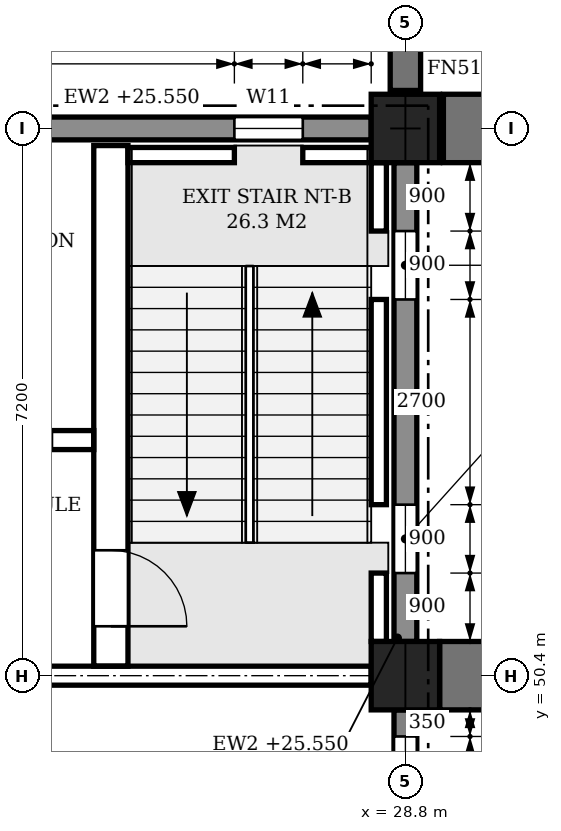
"""IFC4 building model, lengths in metres.
Left out: names, types, materials, properties, quantities, classifications, styles, units other than length and angle.
Written with IfcOpenShell. Run it as: python <this file> out.ifc"""

import sys

from ifc_helpers import new_model, si_unit, direction, frame, frame_2d, origin, origin_2d, place, context, subcontext, project, spatial, polyline, rectangle, outline, extrude, element, fill, save


model = new_model("IFC4")
c1 = context("Model", 3, precision=1e-05, world=origin(), true_north=direction((0.0, 1.0)))
c2 = subcontext(c1, "Body", "Model", "MODEL_VIEW")
j1 = project(units=[si_unit("LENGTHUNIT", "METRE"), si_unit("PLANEANGLEUNIT", "RADIAN")], contexts=[c1])
p1 = place(None, origin())
s1 = spatial("IfcSite", under=j1, at=p1, CompositionType="ELEMENT")
p2 = place(p1, origin())
s2 = spatial("IfcBuilding", under=s1, at=p2, CompositionType="ELEMENT")
p3 = place(p2, frame((0.0, 0.0, 21.6)))
s3 = spatial("IfcBuildingStorey", under=s2, at=p3, CompositionType="ELEMENT", Elevation=21.6)
for number, where, z_axis, x_axis in (
    (1, (28.8, 50.4, 0.0), (0.0, 0.0, 1.0), (1.0, 0.0, 0.0)),
    (2, (28.8, 57.6, 0.0), (0.0, 0.0, 1.0), (1.0, 0.0, 0.0)),
):
    element("IfcColumn", number, at=place(p3, frame(where, z_axis=z_axis, x_axis=x_axis)), inside=s3, PredefinedType="COLUMN", context=c2, shape_type="SweptSolid", body=[
        extrude(rectangle(XDim=0.9, YDim=0.9, at=origin_2d()), origin(), (0.0, 0.0, 1.0), 4.8),
    ])
p4 = place(p3, frame((28.35, 57.6, 0.0), z_axis=(0.0, 0.0, 1.0), x_axis=(-1.0, 0.0, 0.0)))
e3 = element("IfcWall", 3, at=p4, inside=s3, PredefinedType="STANDARD", context=c2, shape_type="SweptSolid", body=[
    extrude(rectangle(XDim=6.3, YDim=0.3, at=frame_2d((3.15, 0.0))), origin(), (0.0, 0.0, 1.0), 3.95),
])
p5 = place(p4, frame((0.9, 0.0, 0.9)))
e4 = element("IfcOpeningElement", 4, at=p5, cuts=e3, PredefinedType="OPENING", context=c2, shape_type="SweptSolid", body=[
    extrude(outline(polyline([(0.0, 0.0), (0.9, 0.0), (0.9, 2.05), (0.45, 2.5), (0.0, 2.05), (0.0, 0.0)])), frame((0.0, 0.16, 0.0), z_axis=(0.0, -1.0, 0.0), x_axis=(1.0, 0.0, 0.0)), (0.0, 0.0, 1.0), 0.32),
])
p6 = place(p3, frame((28.8, 43.65, 0.0), z_axis=(0.0, 0.0, 1.0), x_axis=(0.0, 1.0, 0.0)))
e5 = element("IfcWall", 5, at=p6, inside=s3, PredefinedType="STANDARD", context=c2, shape_type="SweptSolid", body=[
    extrude(rectangle(XDim=6.3, YDim=0.3, at=frame_2d((3.15, 0.0))), origin(), (0.0, 0.0, 1.0), 3.95),
])
p7 = place(p6, frame((3.95, 0.0, 0.9)))
e6 = element("IfcOpeningElement", 6, at=p7, cuts=e5, PredefinedType="OPENING", context=c2, shape_type="SweptSolid", body=[
    extrude(outline(polyline([(0.0, 0.0), (0.85, 0.0), (0.85, 2.05), (0.425, 2.5), (0.0, 2.05), (0.0, 0.0)])), frame((0.0, 0.16, 0.0), z_axis=(0.0, -1.0, 0.0), x_axis=(1.0, 0.0, 0.0)), (0.0, 0.0, 1.0), 0.32),
])
p8 = place(p6, frame((5.1, 0.0, 0.9)))
e7 = element("IfcOpeningElement", 7, at=p8, cuts=e5, PredefinedType="OPENING", context=c2, shape_type="SweptSolid", body=[
    extrude(outline(polyline([(0.0, 0.0), (0.85, 0.0), (0.85, 2.05), (0.425, 2.5), (0.0, 2.05), (0.0, 0.0)])), frame((0.0, 0.16, 0.0), z_axis=(0.0, -1.0, 0.0), x_axis=(1.0, 0.0, 0.0)), (0.0, 0.0, 1.0), 0.32),
])
p9 = place(p3, frame((28.8, 50.85, 0.0), z_axis=(0.0, 0.0, 1.0), x_axis=(0.0, 1.0, 0.0)))
e8 = element("IfcWall", 8, at=p9, inside=s3, PredefinedType="STANDARD", context=c2, shape_type="SweptSolid", body=[
    extrude(rectangle(XDim=6.3, YDim=0.3, at=frame_2d((3.15, 0.0))), origin(), (0.0, 0.0, 1.0), 3.95),
])
p10 = place(p9, frame((0.9, 0.0, 0.9)))
e9 = element("IfcOpeningElement", 9, at=p10, cuts=e8, PredefinedType="OPENING", context=c2, shape_type="SweptSolid", body=[
    extrude(outline(polyline([(0.0, 0.0), (0.9, 0.0), (0.9, 2.05), (0.45, 2.5), (0.0, 2.05), (0.0, 0.0)])), frame((0.0, 0.16, 0.0), z_axis=(0.0, -1.0, 0.0), x_axis=(1.0, 0.0, 0.0)), (0.0, 0.0, 1.0), 0.32),
])
p11 = place(p9, frame((4.5, 0.0, 0.9)))
e10 = element("IfcOpeningElement", 10, at=p11, cuts=e8, PredefinedType="OPENING", context=c2, shape_type="SweptSolid", body=[
    extrude(outline(polyline([(0.0, 0.0), (0.9, 0.0), (0.9, 2.05), (0.45, 2.5), (0.0, 2.05), (0.0, 0.0)])), frame((0.0, 0.16, 0.0), z_axis=(0.0, -1.0, 0.0), x_axis=(1.0, 0.0, 0.0)), (0.0, 0.0, 1.0), 0.32),
])
p12 = place(p3, frame((29.25, 50.4, -0.25), z_axis=(0.0, 0.0, 1.0), x_axis=(1.0, 0.0, 0.0)))
e11 = element("IfcWall", 11, at=p12, inside=s3, PredefinedType="POLYGONAL", context=c2, shape_type="SweptSolid", body=[
    extrude(outline(polyline([(1.1, 0.0), (1.1, 19.2), (0.0, 19.2), (0.0, 0.0), (1.1, 0.0)])), frame((0.0, 0.45, 0.0), z_axis=(0.0, -1.0, 0.0), x_axis=(1.0, 0.0, 0.0)), (0.0, 0.0, 1.0), 0.9),
])
p13 = place(p3, frame((28.8, 58.1, -0.25), z_axis=(0.0, 0.0, 1.0), x_axis=(0.0, 1.0, 0.0)))
e12 = element("IfcWall", 12, at=p13, inside=s3, PredefinedType="POLYGONAL", context=c2, shape_type="SweptSolid", body=[
    extrude(outline(polyline([(0.85, 0.0), (0.85, 18.9), (0.65, 19.2), (0.0, 19.2), (0.0, 0.0), (0.85, 0.0)])), frame((0.0, 0.2, 0.0), z_axis=(0.0, -1.0, 0.0), x_axis=(1.0, 0.0, 0.0)), (0.0, 0.0, 1.0), 0.4),
])
p14 = place(p3, frame((29.3, 57.6, -0.25), z_axis=(0.0, 0.0, 1.0), x_axis=(1.0, 0.0, 0.0)))
e13 = element("IfcWall", 13, at=p14, inside=s3, PredefinedType="POLYGONAL", context=c2, shape_type="SweptSolid", body=[
    extrude(outline(polyline([(1.1, 0.0), (1.1, 19.2), (0.0, 19.2), (0.0, 0.0), (1.1, 0.0)])), frame((0.0, 0.45, 0.0), z_axis=(0.0, -1.0, 0.0), x_axis=(1.0, 0.0, 0.0)), (0.0, 0.0, 1.0), 0.9),
])
p15 = place(p3, frame((22.05, 50.4, 0.0), z_axis=(0.0, 0.0, 1.0), x_axis=(1.0, 0.0, 0.0)))
e14 = element("IfcWall", 14, at=p15, inside=s3, PredefinedType="SHEAR", context=c2, shape_type="SweptSolid", body=[
    extrude(rectangle(XDim=6.3, YDim=0.25, at=frame_2d((3.15, 0.0))), origin(), (0.0, 0.0, 1.0), 3.8),
])
p16 = place(p15, frame((0.4, 0.0, 0.0)))
e15 = element("IfcOpeningElement", 15, at=p16, cuts=e14, PredefinedType="OPENING", context=c2, shape_type="SweptSolid", body=[
    extrude(rectangle(XDim=1.1, YDim=2.1, at=frame_2d((0.55, 1.05))), frame((0.0, 0.135, 0.0), z_axis=(0.0, -1.0, 0.0), x_axis=(1.0, 0.0, 0.0)), (0.0, 0.0, 1.0), 0.27),
])
p17 = place(p3, frame((28.45, 50.85, -0.25), z_axis=(0.0, 0.0, 1.0), x_axis=(0.0, 1.0, 0.0)))
e16 = element("IfcWall", 16, at=p17, inside=s3, PredefinedType="SHEAR", context=c2, shape_type="SweptSolid", body=[
    extrude(rectangle(XDim=0.9, YDim=0.2, at=frame_2d((0.45, 0.0))), origin(), (0.0, 0.0, 1.0), 4.8),
])
p18 = place(p3, frame((28.45, 52.65, -0.25), z_axis=(0.0, 0.0, 1.0), x_axis=(0.0, 1.0, 0.0)))
e17 = element("IfcWall", 17, at=p18, inside=s3, PredefinedType="SHEAR", context=c2, shape_type="SweptSolid", body=[
    extrude(rectangle(XDim=2.7, YDim=0.2, at=frame_2d((1.35, 0.0))), origin(), (0.0, 0.0, 1.0), 4.8),
])
p19 = place(p3, frame((28.45, 56.25, -0.25), z_axis=(0.0, 0.0, 1.0), x_axis=(0.0, 1.0, 0.0)))
e18 = element("IfcWall", 18, at=p19, inside=s3, PredefinedType="SHEAR", context=c2, shape_type="SweptSolid", body=[
    extrude(rectangle(XDim=0.9, YDim=0.2, at=frame_2d((0.45, 0.0))), origin(), (0.0, 0.0, 1.0), 4.8),
])
p20 = place(p3, frame((25.15, 57.25, -0.25), z_axis=(0.0, 0.0, 1.0), x_axis=(1.0, 0.0, 0.0)))
e19 = element("IfcWall", 19, at=p20, inside=s3, PredefinedType="SHEAR", context=c2, shape_type="SweptSolid", body=[
    extrude(rectangle(XDim=1.4, YDim=0.2, at=frame_2d((0.7, 0.0))), origin(), (0.0, 0.0, 1.0), 4.8),
])
p21 = place(p3, frame((27.45, 57.25, -0.25), z_axis=(0.0, 0.0, 1.0), x_axis=(1.0, 0.0, 0.0)))
e20 = element("IfcWall", 20, at=p21, inside=s3, PredefinedType="SHEAR", context=c2, shape_type="SweptSolid", body=[
    extrude(rectangle(XDim=0.9, YDim=0.2, at=frame_2d((0.45, 0.0))), origin(), (0.0, 0.0, 1.0), 4.8),
])
p22 = place(p3, frame((24.925, 50.525, 0.0), z_axis=(0.0, 0.0, 1.0), x_axis=(0.0, 1.0, 0.0)))
e21 = element("IfcWall", 21, at=p22, inside=s3, PredefinedType="SHEAR", context=c2, shape_type="SweptSolid", body=[
    extrude(rectangle(XDim=6.85, YDim=0.45, at=frame_2d((3.425, 0.0))), origin(), (0.0, 0.0, 1.0), 4.55),
])
p23 = place(p22, frame((0.525, 0.0, 0.0)))
e22 = element("IfcOpeningElement", 22, at=p23, cuts=e21, PredefinedType="OPENING", context=c2, shape_type="SweptSolid", body=[
    extrude(rectangle(XDim=1.0, YDim=2.1, at=frame_2d((0.5, 1.05))), frame((0.0, 0.235, 0.0), z_axis=(0.0, -1.0, 0.0), x_axis=(1.0, 0.0, 0.0)), (0.0, 0.0, 1.0), 0.47),
])
p24 = place(p3, frame((21.725, 53.5, 0.0), z_axis=(0.0, 0.0, 1.0), x_axis=(1.0, 0.0, 0.0)))
e23 = element("IfcWall", 23, at=p24, inside=s3, PredefinedType="SHEAR", context=c2, shape_type="SweptSolid", body=[
    extrude(rectangle(XDim=2.975, YDim=0.25, at=frame_2d((1.487, 0.0))), origin(), (0.0, 0.0, 1.0), 4.55),
])
p25 = place(p24, frame((1.525, 0.0, 0.0)))
e24 = element("IfcOpeningElement", 24, at=p25, cuts=e23, PredefinedType="OPENING", context=c2, shape_type="SweptSolid", body=[
    extrude(rectangle(XDim=0.9, YDim=2.1, at=frame_2d((0.45, 1.05))), frame((0.0, 0.135, 0.0), z_axis=(0.0, -1.0, 0.0), x_axis=(1.0, 0.0, 0.0)), (0.0, 0.0, 1.0), 0.27),
])
p26 = place(p8, origin())
e25 = element("IfcWindow", 25, at=p26, inside=s3, PartitioningType="SINGLE_PANEL", PredefinedType="WINDOW", context=c2, shape_type="SweptSolid", body=[
    extrude(outline(polyline([(0.0, 0.0), (0.85, 0.0), (0.85, 2.05), (0.425, 2.5), (0.0, 2.05), (0.0, 0.0)])), frame((0.0, 0.03, 0.0), z_axis=(0.0, -1.0, 0.0), x_axis=(1.0, 0.0, 0.0)), (0.0, 0.0, 1.0), 0.06),
])
fill(e7, e25)
p27 = place(p10, origin())
e26 = element("IfcWindow", 26, at=p27, inside=s3, PartitioningType="SINGLE_PANEL", PredefinedType="WINDOW", context=c2, shape_type="SweptSolid", body=[
    extrude(outline(polyline([(0.0, 0.0), (0.9, 0.0), (0.9, 2.05), (0.45, 2.5), (0.0, 2.05), (0.0, 0.0)])), frame((0.0, 0.03, 0.0), z_axis=(0.0, -1.0, 0.0), x_axis=(1.0, 0.0, 0.0)), (0.0, 0.0, 1.0), 0.06),
])
fill(e9, e26)
p28 = place(p11, origin())
e27 = element("IfcWindow", 27, at=p28, inside=s3, PartitioningType="SINGLE_PANEL", PredefinedType="WINDOW", context=c2, shape_type="SweptSolid", body=[
    extrude(outline(polyline([(0.0, 0.0), (0.9, 0.0), (0.9, 2.05), (0.45, 2.5), (0.0, 2.05), (0.0, 0.0)])), frame((0.0, 0.03, 0.0), z_axis=(0.0, -1.0, 0.0), x_axis=(1.0, 0.0, 0.0)), (0.0, 0.0, 1.0), 0.06),
])
fill(e10, e27)
p29 = place(p5, origin())
e28 = element("IfcWindow", 28, at=p29, inside=s3, PartitioningType="SINGLE_PANEL", PredefinedType="WINDOW", context=c2, shape_type="SweptSolid", body=[
    extrude(outline(polyline([(0.0, 0.0), (0.9, 0.0), (0.9, 2.05), (0.45, 2.5), (0.0, 2.05), (0.0, 0.0)])), frame((0.0, 0.03, 0.0), z_axis=(0.0, -1.0, 0.0), x_axis=(1.0, 0.0, 0.0)), (0.0, 0.0, 1.0), 0.06),
])
fill(e4, e28)
p30 = place(p23, frame((1.0, 0.0, 0.0), z_axis=(0.0, 0.0, 1.0), x_axis=(-1.0, 0.0, 0.0)))
e29 = element("IfcDoor", 29, at=p30, inside=s3, OperationType="SINGLE_SWING_RIGHT", PredefinedType="DOOR", context=c2, shape_type="SweptSolid", body=[
    extrude(rectangle(XDim=1.0, YDim=2.1, at=frame_2d((0.5, 1.05))), frame((0.0, 0.025, 0.0), z_axis=(0.0, -1.0, 0.0), x_axis=(1.0, 0.0, 0.0)), (0.0, 0.0, 1.0), 0.05),
])
fill(e22, e29)
save(model, sys.argv[1])
